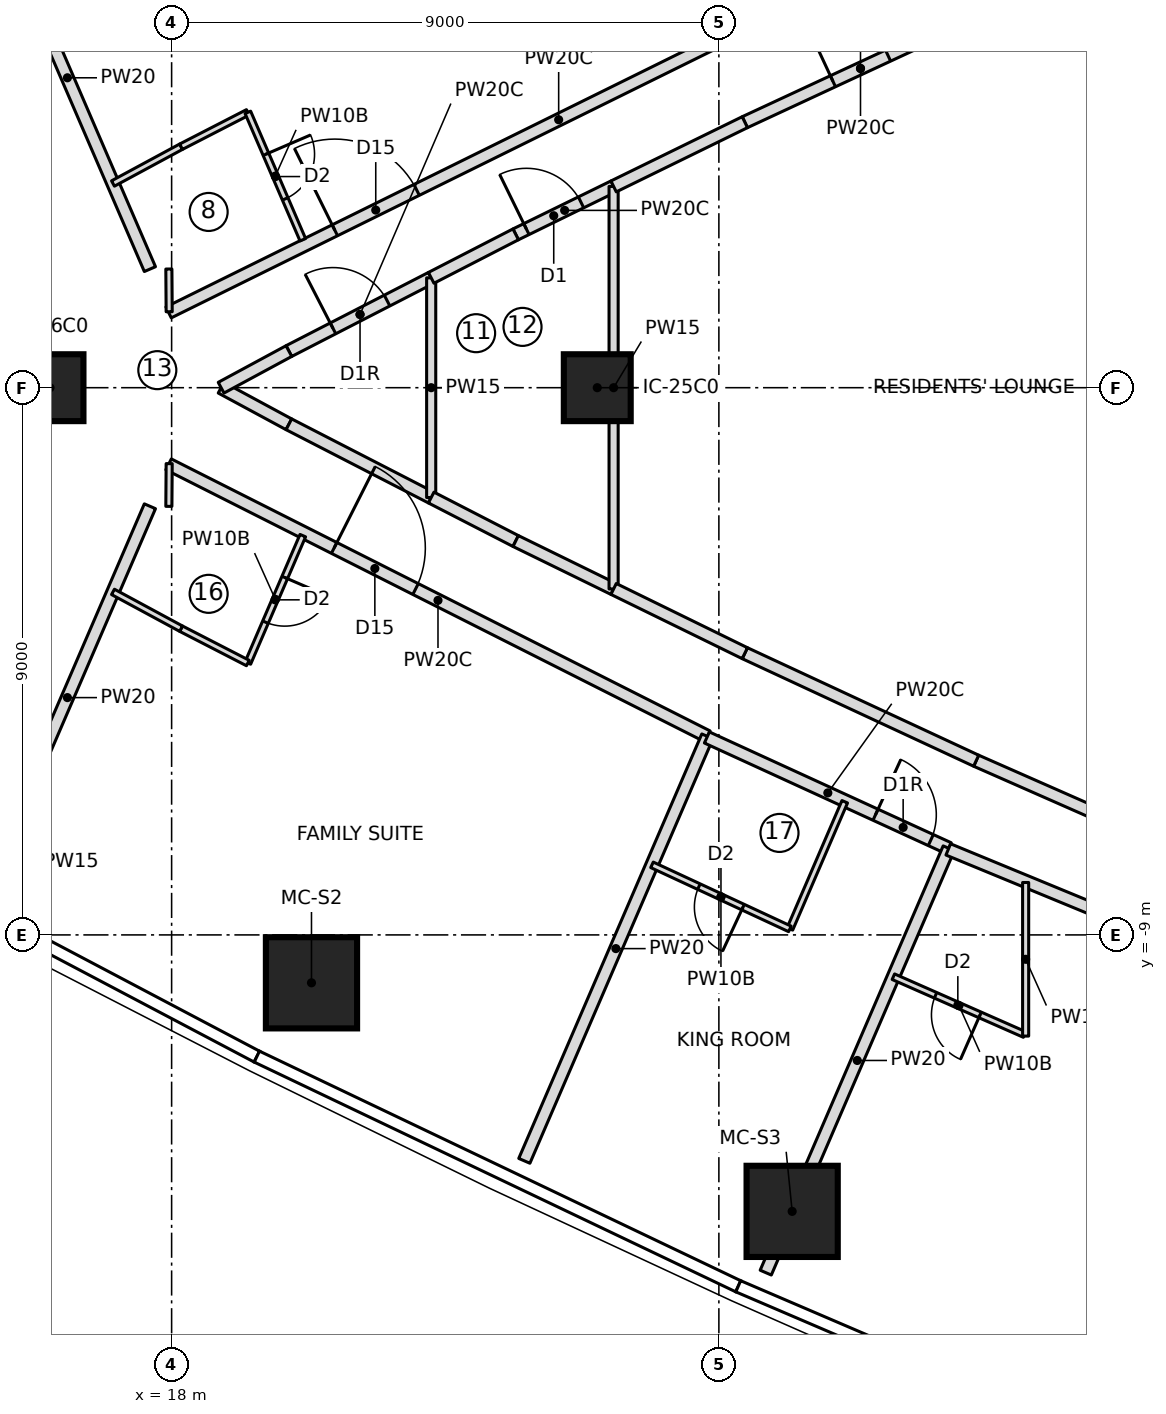
"""IFC4 building model, lengths in metres.
Left out: names, types, materials, properties, quantities, classifications, styles, units other than length and angle.
Written with IfcOpenShell. Run it as: python <this file> out.ifc"""

import sys

from ifc_helpers import new_model, si_unit, direction, frame, frame_2d, origin, origin_2d, place, context, subcontext, project, spatial, rectangle, extrude, element, fill, save


model = new_model("IFC4")
c1 = context("Model", 3, precision=1e-05, world=origin(), true_north=direction((0.0, 1.0)))
c2 = subcontext(c1, "Body", "Model", "MODEL_VIEW")
j1 = project(units=[si_unit("LENGTHUNIT", "METRE"), si_unit("PLANEANGLEUNIT", "RADIAN")], contexts=[c1])
p1 = place(None, origin())
s1 = spatial("IfcSite", under=j1, at=p1, CompositionType="ELEMENT")
p2 = place(p1, origin())
s2 = spatial("IfcBuilding", under=s1, at=p2, CompositionType="ELEMENT")
p3 = place(p2, frame((0.0, 0.0, 133.75)))
s3 = spatial("IfcBuildingStorey", under=s2, at=p3, CompositionType="ELEMENT", Elevation=133.75)
for number, where, z_axis, x_axis in (
    (1, (20.3, -9.788, 0.0), (0.0, 0.0, 1.0), (1.0, 0.0, 0.0)),
    (2, (28.205, -13.547, 0.0), (0.0, 0.0, 1.0), (1.0, 0.0, 0.0)),
):
    element("IfcColumn", number, at=place(p3, frame(where, z_axis=z_axis, x_axis=x_axis)), inside=s3, PredefinedType="COLUMN", context=c2, shape_type="SweptSolid", body=[
        extrude(rectangle(XDim=1.5, YDim=1.5, at=origin_2d()), origin(), (0.0, 0.0, 1.0), 3.55),
    ])
for number, where, z_axis, x_axis in (
    (3, (16.0, 0.0, 0.0), (0.0, 0.0, 1.0), (1.0, 0.0, 0.0)),
    (4, (25.0, 0.0, 0.0), (0.0, 0.0, 1.0), (1.0, 0.0, 0.0)),
):
    element("IfcColumn", number, at=place(p3, frame(where, z_axis=z_axis, x_axis=x_axis)), inside=s3, PredefinedType="COLUMN", context=c2, shape_type="SweptSolid", body=[
        extrude(rectangle(XDim=1.1, YDim=1.1, at=origin_2d()), origin(), (0.0, 0.0, 1.0), 3.55),
    ])
p4 = place(p3, frame((17.643, 1.95, 0.0), z_axis=(0.0, 0.0, 1.0), x_axis=(-0.395994543879, 0.918252863441, 0.0)))
e5 = element("IfcWall", 5, at=p4, inside=s3, PredefinedType="PARTITIONING", context=c2, shape_type="SweptSolid", body=[
    extrude(rectangle(XDim=6.854, YDim=0.2, at=frame_2d((3.427, 0.0))), origin(), (0.0, 0.0, 1.0), 3.25),
])
p5 = place(p3, frame((17.95, 1.238, 0.0), z_axis=(0.0, 0.0, 1.0), x_axis=(0.896593504408, 0.44285447706, 0.0)))
e6 = element("IfcWall", 6, at=p5, inside=s3, PredefinedType="PARTITIONING", context=c2, shape_type="SweptSolid", body=[
    extrude(rectangle(XDim=14.31, YDim=0.2, at=frame_2d((7.155, 0.0))), origin(), (0.0, 0.0, 1.0), 3.25),
])
p6 = place(p5, frame((3.05, 0.0, 0.0)))
e7 = element("IfcOpeningElement", 7, at=p6, cuts=e6, PredefinedType="OPENING", context=c2, shape_type="SweptSolid", body=[
    extrude(rectangle(XDim=1.5, YDim=2.1, at=frame_2d((0.75, 1.05))), frame((0.0, 0.11, 0.0), z_axis=(0.0, -1.0, 0.0), x_axis=(1.0, 0.0, 0.0)), (0.0, 0.0, 1.0), 0.22),
])
p7 = place(p3, frame((17.036, 3.358, 0.0), z_axis=(0.0, 0.0, 1.0), x_axis=(0.879823588489, 0.475300382009, 0.0)))
e8 = element("IfcWall", 8, at=p7, inside=s3, PredefinedType="PARTITIONING", context=c2, shape_type="SweptSolid", body=[
    extrude(rectangle(XDim=1.273, YDim=0.1, at=frame_2d((0.636, 0.0))), origin(), (0.0, 0.0, 1.0), 3.25),
])
p8 = place(p3, frame((18.156, 3.963, 0.0), z_axis=(0.0, 0.0, 1.0), x_axis=(0.889106231322, 0.457700895154, 0.0)))
e9 = element("IfcWall", 9, at=p8, inside=s3, PredefinedType="PARTITIONING", context=c2, shape_type="SweptSolid", body=[
    extrude(rectangle(XDim=1.235, YDim=0.1, at=frame_2d((0.617, 0.0))), origin(), (0.0, 0.0, 1.0), 3.25),
])
p9 = place(p3, frame((19.254, 4.529, 0.0), z_axis=(0.0, 0.0, 1.0), x_axis=(0.395958457437, -0.9182684248, 0.0)))
e10 = element("IfcWall", 10, at=p9, inside=s3, PredefinedType="PARTITIONING", context=c2, shape_type="SweptSolid", body=[
    extrude(rectangle(XDim=2.282, YDim=0.1, at=frame_2d((1.141, 0.0))), origin(), (0.0, 0.0, 1.0), 3.25),
])
p10 = place(p9, frame((0.75, 0.0, 0.0)))
e11 = element("IfcOpeningElement", 11, at=p10, cuts=e10, PredefinedType="OPENING", context=c2, shape_type="SweptSolid", body=[
    extrude(rectangle(XDim=0.8, YDim=2.1, at=frame_2d((0.4, 1.05))), frame((0.0, 0.06, 0.0), z_axis=(0.0, -1.0, 0.0), x_axis=(1.0, 0.0, 0.0)), (0.0, 0.0, 1.0), 0.12),
])
p11 = place(p3, frame((14.929, -8.244, 0.0), z_axis=(0.0, 0.0, 1.0), x_axis=(0.395994543879, 0.918252863441, 0.0)))
e12 = element("IfcWall", 12, at=p11, inside=s3, PredefinedType="PARTITIONING", context=c2, shape_type="SweptSolid", body=[
    extrude(rectangle(XDim=6.854, YDim=0.2, at=frame_2d((3.427, 0.0))), origin(), (0.0, 0.0, 1.0), 3.25),
])
p12 = place(p3, frame((17.95, -1.261, 0.0), z_axis=(0.0, 0.0, 1.0), x_axis=(0.892679126003, -0.450692775623, 0.0)))
e13 = element("IfcWall", 13, at=p12, inside=s3, PredefinedType="PARTITIONING", context=c2, shape_type="SweptSolid", body=[
    extrude(rectangle(XDim=9.927, YDim=0.2, at=frame_2d((4.963, 0.0))), origin(), (0.0, 0.0, 1.0), 3.25),
])
p13 = place(p12, frame((3.05, 0.0, 0.0)))
e14 = element("IfcOpeningElement", 14, at=p13, cuts=e13, PredefinedType="OPENING", context=c2, shape_type="SweptSolid", body=[
    extrude(rectangle(XDim=1.5, YDim=2.1, at=frame_2d((0.75, 1.05))), frame((0.0, 0.11, 0.0), z_axis=(0.0, -1.0, 0.0), x_axis=(1.0, 0.0, 0.0)), (0.0, 0.0, 1.0), 0.22),
])
p14 = place(p3, frame((20.157, -2.433, 0.0), z_axis=(0.0, 0.0, 1.0), x_axis=(-0.395958457437, -0.9182684248, 0.0)))
e15 = element("IfcWall", 15, at=p14, inside=s3, PredefinedType="PARTITIONING", context=c2, shape_type="SweptSolid", body=[
    extrude(rectangle(XDim=2.282, YDim=0.1, at=frame_2d((1.141, 0.0))), origin(), (0.0, 0.0, 1.0), 3.25),
])
p15 = place(p14, frame((0.75, 0.0, 0.0)))
e16 = element("IfcOpeningElement", 16, at=p15, cuts=e15, PredefinedType="OPENING", context=c2, shape_type="SweptSolid", body=[
    extrude(rectangle(XDim=0.8, YDim=2.1, at=frame_2d((0.4, 1.05))), frame((0.0, 0.06, 0.0), z_axis=(0.0, -1.0, 0.0), x_axis=(1.0, 0.0, 0.0)), (0.0, 0.0, 1.0), 0.12),
])
p16 = place(p3, frame((19.253, -4.529, 0.0), z_axis=(0.0, 0.0, 1.0), x_axis=(-0.889106231322, 0.457700895154, 0.0)))
e17 = element("IfcWall", 17, at=p16, inside=s3, PredefinedType="PARTITIONING", context=c2, shape_type="SweptSolid", body=[
    extrude(rectangle(XDim=1.235, YDim=0.1, at=frame_2d((0.617, 0.0))), origin(), (0.0, 0.0, 1.0), 3.25),
])
p17 = place(p3, frame((18.156, -3.963, 0.0), z_axis=(0.0, 0.0, 1.0), x_axis=(-0.879823588489, 0.475300382009, 0.0)))
e18 = element("IfcWall", 18, at=p17, inside=s3, PredefinedType="PARTITIONING", context=c2, shape_type="SweptSolid", body=[
    extrude(rectangle(XDim=1.273, YDim=0.1, at=frame_2d((0.636, 0.0))), origin(), (0.0, 0.0, 1.0), 3.25),
])
p18 = place(p3, frame((23.801, -12.716, 0.0), z_axis=(0.0, 0.0, 1.0), x_axis=(0.395995556294, 0.918252426839, 0.0)))
e19 = element("IfcWall", 19, at=p18, inside=s3, PredefinedType="PARTITIONING", context=c2, shape_type="SweptSolid", body=[
    extrude(rectangle(XDim=7.603, YDim=0.2, at=frame_2d((3.802, 0.0))), origin(), (0.0, 0.0, 1.0), 3.25),
])
p19 = place(p3, frame((26.803, -5.753, 0.0), z_axis=(0.0, 0.0, 1.0), x_axis=(0.90910092787, -0.416575926987, 0.0)))
e20 = element("IfcWall", 20, at=p19, inside=s3, PredefinedType="PARTITIONING", context=c2, shape_type="SweptSolid", body=[
    extrude(rectangle(XDim=4.375, YDim=0.2, at=frame_2d((2.188, 0.0))), origin(), (0.0, 0.0, 1.0), 3.25),
])
p20 = place(p19, frame((3.05, 0.0, 0.0)))
e21 = element("IfcOpeningElement", 21, at=p20, cuts=e20, PredefinedType="OPENING", context=c2, shape_type="SweptSolid", body=[
    extrude(rectangle(XDim=1.0, YDim=2.1, at=frame_2d((0.5, 1.05))), frame((0.0, 0.11, 0.0), z_axis=(0.0, -1.0, 0.0), x_axis=(1.0, 0.0, 0.0)), (0.0, 0.0, 1.0), 0.22),
])
p21 = place(p3, frame((29.07, -6.81, 0.0), z_axis=(0.0, 0.0, 1.0), x_axis=(-0.396000751487, -0.918250186399, 0.0)))
e22 = element("IfcWall", 22, at=p21, inside=s3, PredefinedType="PARTITIONING", context=c2, shape_type="SweptSolid", body=[
    extrude(rectangle(XDim=2.278, YDim=0.1, at=frame_2d((1.139, 0.0))), origin(), (0.0, 0.0, 1.0), 3.25),
])
p22 = place(p3, frame((28.168, -8.902, 0.0), z_axis=(0.0, 0.0, 1.0), x_axis=(-0.906813113059, 0.421532890751, 0.0)))
e23 = element("IfcWall", 23, at=p22, inside=s3, PredefinedType="PARTITIONING", context=c2, shape_type="SweptSolid", body=[
    extrude(rectangle(XDim=2.501, YDim=0.1, at=frame_2d((1.25, 0.0))), origin(), (0.0, 0.0, 1.0), 3.25),
])
p23 = place(p22, frame((0.85, 0.0, 0.0)))
e24 = element("IfcOpeningElement", 24, at=p23, cuts=e23, PredefinedType="OPENING", context=c2, shape_type="SweptSolid", body=[
    extrude(rectangle(XDim=0.8, YDim=2.1, at=frame_2d((0.4, 1.05))), frame((0.0, 0.06, 0.0), z_axis=(0.0, -1.0, 0.0), x_axis=(1.0, 0.0, 0.0)), (0.0, 0.0, 1.0), 0.12),
])
p24 = place(p3, frame((27.771, -14.554, 0.0), z_axis=(0.0, 0.0, 1.0), x_axis=(0.396004020147, 0.918248776763, 0.0)))
e25 = element("IfcWall", 25, at=p24, inside=s3, PredefinedType="PARTITIONING", context=c2, shape_type="SweptSolid", body=[
    extrude(rectangle(XDim=7.6, YDim=0.2, at=frame_2d((3.8, 0.0))), origin(), (0.0, 0.0, 1.0), 3.25),
])
p25 = place(p3, frame((30.772, -7.594, 0.0), z_axis=(0.0, 0.0, 1.0), x_axis=(0.924461873383, -0.381274500407, 0.0)))
e26 = element("IfcWall", 26, at=p25, inside=s3, PredefinedType="PARTITIONING", context=c2, shape_type="SweptSolid", body=[
    extrude(rectangle(XDim=13.127, YDim=0.2, at=frame_2d((6.564, 0.0))), origin(), (0.0, 0.0, 1.0), 3.25),
])
p26 = place(p25, frame((4.25, 0.0, 0.0)))
e27 = element("IfcOpeningElement", 27, at=p26, cuts=e26, PredefinedType="OPENING", context=c2, shape_type="SweptSolid", body=[
    extrude(rectangle(XDim=1.5, YDim=2.1, at=frame_2d((0.75, 1.05))), frame((0.0, 0.11, 0.0), z_axis=(0.0, -1.0, 0.0), x_axis=(1.0, 0.0, 0.0)), (0.0, 0.0, 1.0), 0.22),
])
p27 = place(p3, frame((32.028, -10.638, 0.0), z_axis=(0.0, 0.0, 1.0), x_axis=(-0.915108845766, 0.403206895278, 0.0)))
e28 = element("IfcWall", 28, at=p27, inside=s3, PredefinedType="PARTITIONING", context=c2, shape_type="SweptSolid", body=[
    extrude(rectangle(XDim=2.358, YDim=0.1, at=frame_2d((1.179, 0.0))), origin(), (0.0, 0.0, 1.0), 3.25),
])
p28 = place(p27, frame((0.8, 0.0, 0.0)))
e29 = element("IfcOpeningElement", 29, at=p28, cuts=e28, PredefinedType="OPENING", context=c2, shape_type="SweptSolid", body=[
    extrude(rectangle(XDim=0.8, YDim=2.1, at=frame_2d((0.4, 1.05))), frame((0.0, 0.06, 0.0), z_axis=(0.0, -1.0, 0.0), x_axis=(1.0, 0.0, 0.0)), (0.0, 0.0, 1.0), 0.12),
])
p29 = place(p3, frame((19.928, 0.602, 0.0), z_axis=(0.0, 0.0, 1.0), x_axis=(0.889134700325, 0.457645588505, 0.0)))
e30 = element("IfcWall", 30, at=p29, inside=s3, PredefinedType="PARTITIONING", context=c2, shape_type="SweptSolid", body=[
    extrude(rectangle(XDim=2.632, YDim=0.2, at=frame_2d((1.316, 0.0))), origin(), (0.0, 0.0, 1.0), 3.25),
])
p30 = place(p29, frame((0.816, 0.0, 0.0)))
e31 = element("IfcOpeningElement", 31, at=p30, cuts=e30, PredefinedType="OPENING", context=c2, shape_type="SweptSolid", body=[
    extrude(rectangle(XDim=1.0, YDim=2.1, at=frame_2d((0.5, 1.05))), frame((0.0, 0.11, 0.0), z_axis=(0.0, -1.0, 0.0), x_axis=(1.0, 0.0, 0.0)), (0.0, 0.0, 1.0), 0.22),
])
for number, where, z_axis, x_axis in (
    (32, (19.928, -0.602, 0.0), (0.0, 0.0, 1.0), (-0.88, 0.475, 0.0)),
    (33, (18.814, 0.0, 0.0), (0.0, 0.0, 1.0), (0.88, 0.475, 0.0)),
):
    element("IfcWall", number, at=place(p3, frame(where, z_axis=z_axis, x_axis=x_axis)), inside=s3, PredefinedType="PARTITIONING", context=c2, shape_type="SweptSolid", body=[
        extrude(rectangle(XDim=1.267, YDim=0.2, at=frame_2d((0.633, 0.0))), origin(), (0.0, 0.0, 1.0), 3.25),
    ])
p31 = place(p3, frame((22.269, -1.807, 0.0), z_axis=(0.0, 0.0, 1.0), x_axis=(-0.889134700325, 0.457645588505, 0.0)))
e34 = element("IfcWall", 34, at=p31, inside=s3, PredefinedType="PARTITIONING", context=c2, shape_type="SweptSolid", body=[
    extrude(rectangle(XDim=2.632, YDim=0.2, at=frame_2d((1.316, 0.0))), origin(), (0.0, 0.0, 1.0), 3.25),
])
p32 = place(p3, frame((22.269, -1.807, 0.0), z_axis=(0.0, 0.0, 1.0), x_axis=(0.0, 1.0, 0.0)))
e35 = element("IfcWall", 35, at=p32, inside=s3, PredefinedType="PARTITIONING", context=c2, shape_type="SweptSolid", body=[
    extrude(rectangle(XDim=3.613, YDim=0.15, at=frame_2d((1.807, 0.0))), origin(), (0.0, 0.0, 1.0), 3.25),
])
p33 = place(p3, frame((23.659, 2.522, 0.0), z_axis=(0.0, 0.0, 1.0), x_axis=(0.898127473276, 0.439735195028, 0.0)))
e36 = element("IfcWall", 36, at=p33, inside=s3, PredefinedType="PARTITIONING", context=c2, shape_type="SweptSolid", body=[
    extrude(rectangle(XDim=1.793, YDim=0.2, at=frame_2d((0.896, 0.0))), origin(), (0.0, 0.0, 1.0), 3.25),
])
p34 = place(p33, frame((0.196, 0.0, 0.0)))
e37 = element("IfcOpeningElement", 37, at=p34, cuts=e36, PredefinedType="OPENING", context=c2, shape_type="SweptSolid", body=[
    extrude(rectangle(XDim=1.0, YDim=2.1, at=frame_2d((0.5, 1.05))), frame((0.0, 0.11, 0.0), z_axis=(0.0, -1.0, 0.0), x_axis=(1.0, 0.0, 0.0)), (0.0, 0.0, 1.0), 0.22),
])
for number, where, z_axis, x_axis in (
    (38, (23.659, -2.522, 0.0), (0.0, 0.0, 1.0), (-0.889, 0.458, 0.0)),
    (39, (22.269, 1.807, 0.0), (0.0, 0.0, 1.0), (0.889, 0.458, 0.0)),
):
    element("IfcWall", number, at=place(p3, frame(where, z_axis=z_axis, x_axis=x_axis)), inside=s3, PredefinedType="PARTITIONING", context=c2, shape_type="SweptSolid", body=[
        extrude(rectangle(XDim=1.563, YDim=0.2, at=frame_2d((0.782, 0.0))), origin(), (0.0, 0.0, 1.0), 3.25),
    ])
p35 = place(p3, frame((25.269, -3.31, 0.0), z_axis=(0.0, 0.0, 1.0), x_axis=(-0.898127473276, 0.439735195028, 0.0)))
e40 = element("IfcWall", 40, at=p35, inside=s3, PredefinedType="PARTITIONING", context=c2, shape_type="SweptSolid", body=[
    extrude(rectangle(XDim=1.793, YDim=0.2, at=frame_2d((0.896, 0.0))), origin(), (0.0, 0.0, 1.0), 3.25),
])
p36 = place(p3, frame((25.269, -3.31, 0.0), z_axis=(0.0, 0.0, 1.0), x_axis=(0.0, 1.0, 0.0)))
e41 = element("IfcWall", 41, at=p36, inside=s3, PredefinedType="PARTITIONING", context=c2, shape_type="SweptSolid", body=[
    extrude(rectangle(XDim=6.621, YDim=0.15, at=frame_2d((3.31, 0.0))), origin(), (0.0, 0.0, 1.0), 3.25),
])
p37 = place(p3, frame((27.427, 4.367, 0.0), z_axis=(0.0, 0.0, 1.0), x_axis=(0.906830275285, 0.421495968933, 0.0)))
e42 = element("IfcWall", 42, at=p37, inside=s3, PredefinedType="PARTITIONING", context=c2, shape_type="SweptSolid", body=[
    extrude(rectangle(XDim=4.195, YDim=0.2, at=frame_2d((2.098, 0.0))), origin(), (0.0, 0.0, 1.0), 3.25),
])
p38 = place(p37, frame((1.598, 0.0, 0.0)))
e43 = element("IfcOpeningElement", 43, at=p38, cuts=e42, PredefinedType="OPENING", context=c2, shape_type="SweptSolid", body=[
    extrude(rectangle(XDim=1.0, YDim=2.1, at=frame_2d((0.5, 1.05))), frame((0.0, 0.11, 0.0), z_axis=(0.0, -1.0, 0.0), x_axis=(1.0, 0.0, 0.0)), (0.0, 0.0, 1.0), 0.22),
])
p39 = place(p3, frame((33.308, -7.05, 0.0), z_axis=(0.0, 0.0, 1.0), x_axis=(-0.915102334452, 0.403221672881, 0.0)))
e44 = element("IfcWall", 44, at=p39, inside=s3, PredefinedType="PARTITIONING", context=c2, shape_type="SweptSolid", body=[
    extrude(rectangle(XDim=2.269, YDim=0.2, at=frame_2d((1.135, 0.0))), origin(), (0.0, 0.0, 1.0), 3.25),
])
p40 = place(p3, frame((31.231, -6.135, 0.0), z_axis=(0.0, 0.0, 1.0), x_axis=(-0.906830275285, 0.421495968933, 0.0)))
e45 = element("IfcWall", 45, at=p40, inside=s3, PredefinedType="PARTITIONING", context=c2, shape_type="SweptSolid", body=[
    extrude(rectangle(XDim=4.195, YDim=0.2, at=frame_2d((2.098, 0.0))), origin(), (0.0, 0.0, 1.0), 3.25),
])
for number, where, z_axis, x_axis in (
    (46, (27.427, -4.367, 0.0), (0.0, 0.0, 1.0), (-0.898, 0.44, 0.0)),
    (47, (25.269, 3.31, 0.0), (0.0, 0.0, 1.0), (0.898, 0.44, 0.0)),
):
    element("IfcWall", number, at=place(p3, frame(where, z_axis=z_axis, x_axis=x_axis)), inside=s3, PredefinedType="PARTITIONING", context=c2, shape_type="SweptSolid", body=[
        extrude(rectangle(XDim=2.403, YDim=0.2, at=frame_2d((1.201, 0.0))), origin(), (0.0, 0.0, 1.0), 3.25),
    ])
for number, where, z_axis, x_axis in (
    (48, (17.96, 1.249, 0.0), (0.0, 0.0, 1.0), (-0.007, 1.0, 0.0)),
    (49, (17.955, -1.952, 0.0), (0.0, 0.0, 1.0), (0.007, 1.0, 0.0)),
):
    element("IfcWall", number, at=place(p3, frame(where, z_axis=z_axis, x_axis=x_axis)), inside=s3, PredefinedType="PARTITIONING", context=c2, shape_type="SweptSolid", body=[
        extrude(rectangle(XDim=0.703, YDim=0.1, at=frame_2d((0.352, 0.0))), origin(), (0.0, 0.0, 1.0), 3.25),
    ])
p41 = place(p3, frame((32.045, -8.138, 0.0), z_axis=(0.0, 0.0, 1.0), x_axis=(0.0, -1.0, 0.0)))
e50 = element("IfcWall", 50, at=p41, inside=s3, PredefinedType="PARTITIONING", context=c2, shape_type="SweptSolid", body=[
    extrude(rectangle(XDim=2.526, YDim=0.1, at=frame_2d((1.263, 0.0))), origin(), (0.0, 0.0, 1.0), 3.25),
])
p42 = place(p10, origin())
e51 = element("IfcDoor", 51, at=p42, inside=s3, OperationType="SINGLE_SWING_LEFT", PredefinedType="DOOR", context=c2, shape_type="SweptSolid", body=[
    extrude(rectangle(XDim=0.8, YDim=2.1, at=frame_2d((0.4, 1.05))), frame((0.0, 0.025, 0.0), z_axis=(0.0, -1.0, 0.0), x_axis=(1.0, 0.0, 0.0)), (0.0, 0.0, 1.0), 0.05),
])
fill(e11, e51)
p43 = place(p6, origin())
e52 = element("IfcDoor", 52, at=p43, inside=s3, OperationType="DOUBLE_DOOR_SINGLE_SWING", PredefinedType="DOOR", context=c2, shape_type="SweptSolid", body=[
    extrude(rectangle(XDim=1.5, YDim=2.1, at=frame_2d((0.75, 1.05))), frame((0.0, 0.025, 0.0), z_axis=(0.0, -1.0, 0.0), x_axis=(1.0, 0.0, 0.0)), (0.0, 0.0, 1.0), 0.05),
])
fill(e7, e52)
p44 = place(p15, origin())
e53 = element("IfcDoor", 53, at=p44, inside=s3, OperationType="SINGLE_SWING_LEFT", PredefinedType="DOOR", context=c2, shape_type="SweptSolid", body=[
    extrude(rectangle(XDim=0.8, YDim=2.1, at=frame_2d((0.4, 1.05))), frame((0.0, 0.025, 0.0), z_axis=(0.0, -1.0, 0.0), x_axis=(1.0, 0.0, 0.0)), (0.0, 0.0, 1.0), 0.05),
])
fill(e16, e53)
p45 = place(p13, origin())
e54 = element("IfcDoor", 54, at=p45, inside=s3, OperationType="DOUBLE_DOOR_SINGLE_SWING", PredefinedType="DOOR", context=c2, shape_type="SweptSolid", body=[
    extrude(rectangle(XDim=1.5, YDim=2.1, at=frame_2d((0.75, 1.05))), frame((0.0, 0.025, 0.0), z_axis=(0.0, -1.0, 0.0), x_axis=(1.0, 0.0, 0.0)), (0.0, 0.0, 1.0), 0.05),
])
fill(e14, e54)
p46 = place(p23, origin())
e55 = element("IfcDoor", 55, at=p46, inside=s3, OperationType="SINGLE_SWING_LEFT", PredefinedType="DOOR", context=c2, shape_type="SweptSolid", body=[
    extrude(rectangle(XDim=0.8, YDim=2.1, at=frame_2d((0.4, 1.05))), frame((0.0, 0.025, 0.0), z_axis=(0.0, -1.0, 0.0), x_axis=(1.0, 0.0, 0.0)), (0.0, 0.0, 1.0), 0.05),
])
fill(e24, e55)
p47 = place(p20, origin())
e56 = element("IfcDoor", 56, at=p47, inside=s3, OperationType="SINGLE_SWING_RIGHT", PredefinedType="DOOR", context=c2, shape_type="SweptSolid", body=[
    extrude(rectangle(XDim=1.0, YDim=2.1, at=frame_2d((0.5, 1.05))), frame((0.0, 0.025, 0.0), z_axis=(0.0, -1.0, 0.0), x_axis=(1.0, 0.0, 0.0)), (0.0, 0.0, 1.0), 0.05),
])
fill(e21, e56)
p48 = place(p28, origin())
e57 = element("IfcDoor", 57, at=p48, inside=s3, OperationType="SINGLE_SWING_LEFT", PredefinedType="DOOR", context=c2, shape_type="SweptSolid", body=[
    extrude(rectangle(XDim=0.8, YDim=2.1, at=frame_2d((0.4, 1.05))), frame((0.0, 0.025, 0.0), z_axis=(0.0, -1.0, 0.0), x_axis=(1.0, 0.0, 0.0)), (0.0, 0.0, 1.0), 0.05),
])
fill(e29, e57)
p49 = place(p30, origin())
e58 = element("IfcDoor", 58, at=p49, inside=s3, OperationType="SINGLE_SWING_RIGHT", PredefinedType="DOOR", context=c2, shape_type="SweptSolid", body=[
    extrude(rectangle(XDim=1.0, YDim=2.1, at=frame_2d((0.5, 1.05))), frame((0.0, 0.025, 0.0), z_axis=(0.0, -1.0, 0.0), x_axis=(1.0, 0.0, 0.0)), (0.0, 0.0, 1.0), 0.05),
])
fill(e31, e58)
p50 = place(p34, origin())
e59 = element("IfcDoor", 59, at=p50, inside=s3, OperationType="SINGLE_SWING_LEFT", PredefinedType="DOOR", context=c2, shape_type="SweptSolid", body=[
    extrude(rectangle(XDim=1.0, YDim=2.1, at=frame_2d((0.5, 1.05))), frame((0.0, 0.025, 0.0), z_axis=(0.0, -1.0, 0.0), x_axis=(1.0, 0.0, 0.0)), (0.0, 0.0, 1.0), 0.05),
])
fill(e37, e59)
p51 = place(p38, origin())
e60 = element("IfcDoor", 60, at=p51, inside=s3, OperationType="SINGLE_SWING_RIGHT", PredefinedType="DOOR", context=c2, shape_type="SweptSolid", body=[
    extrude(rectangle(XDim=1.0, YDim=2.1, at=frame_2d((0.5, 1.05))), frame((0.0, 0.025, 0.0), z_axis=(0.0, -1.0, 0.0), x_axis=(1.0, 0.0, 0.0)), (0.0, 0.0, 1.0), 0.05),
])
fill(e43, e60)
save(model, sys.argv[1])
